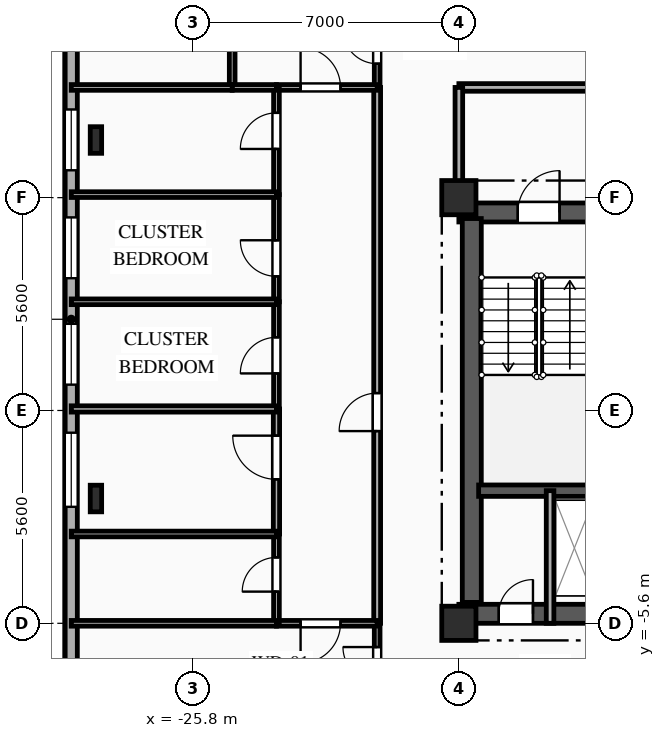
"""IFC4 building model, lengths in metres.
Left out: names, types, materials, properties, quantities, classifications, styles, units other than length and angle.
Written with IfcOpenShell. Run it as: python <this file> out.ifc"""

import sys

from ifc_helpers import new_model, si_unit, direction, frame, frame_2d, origin, origin_2d, place, context, subcontext, project, spatial, rectangle, i_section, extrude, element, fill, save


model = new_model("IFC4")
c1 = context("Model", 3, precision=1e-05, world=origin(), true_north=direction((0.0, 1.0)))
c2 = subcontext(c1, "Body", "Model", "MODEL_VIEW")
j1 = project(units=[si_unit("LENGTHUNIT", "METRE"), si_unit("PLANEANGLEUNIT", "RADIAN")], contexts=[c1])
p1 = place(None, origin())
s1 = spatial("IfcSite", under=j1, at=p1, CompositionType="ELEMENT")
p2 = place(p1, origin())
s2 = spatial("IfcBuilding", under=s1, at=p2, CompositionType="ELEMENT")
p3 = place(p2, frame((0.0, 0.0, 154.45)))
s3 = spatial("IfcBuildingStorey", under=s2, at=p3, CompositionType="ELEMENT", Elevation=154.45)
for number, where, z_axis, x_axis in (
    (1, (-18.8, -5.6, 0.0), (0.0, 0.0, 1.0), (1.0, 0.0, 0.0)),
    (2, (-18.8, 5.6, 0.0), (0.0, 0.0, 1.0), (1.0, 0.0, 0.0)),
):
    element("IfcColumn", number, at=place(p3, frame(where, z_axis=z_axis, x_axis=x_axis)), inside=s3, PredefinedType="COLUMN", context=c2, shape_type="SweptSolid", body=[
        extrude(rectangle(XDim=0.9, YDim=0.9, at=origin_2d()), origin(), (0.0, 0.0, 1.0), 3.35),
    ])
for number, where, z_axis, x_axis in (
    (3, (-28.35, 7.117, 0.0), (0.0, 0.0, 1.0), (1.0, 0.0, 0.0)),
    (4, (-28.35, -2.317, 0.0), (0.0, 0.0, 1.0), (1.0, 0.0, 0.0)),
):
    element("IfcColumn", number, at=place(p3, frame(where, z_axis=z_axis, x_axis=x_axis)), inside=s3, PredefinedType="COLUMN", context=c2, shape_type="SweptSolid", body=[
        extrude(i_section(OverallWidth=0.3, OverallDepth=0.7, WebThickness=0.017, FlangeThickness=0.032, FilletRadius=0.027, at=origin_2d()), origin(), (0.0, 0.0, 1.0), 3.35),
    ])
p4 = place(p3, frame((-29.0, -12.4, 0.0), z_axis=(0.0, 0.0, 1.0), x_axis=(0.0, 1.0, 0.0)))
e5 = element("IfcWall", 5, at=p4, inside=s3, PredefinedType="SOLIDWALL", context=c2, shape_type="SweptSolid", body=[
    extrude(rectangle(XDim=29.6, YDim=0.32, at=frame_2d((14.8, 0.0))), origin(), (0.0, 0.0, 1.0), 3.04),
])
p5 = place(p4, frame((2.855, 0.0, 0.85)))
e6 = element("IfcOpeningElement", 6, at=p5, cuts=e5, PredefinedType="OPENING", context=c2, shape_type="SweptSolid", body=[
    extrude(rectangle(XDim=1.65, YDim=1.85, at=frame_2d((0.825, 0.925))), frame((0.0, 0.17, 0.0), z_axis=(0.0, -1.0, 0.0), x_axis=(1.0, 0.0, 0.0)), (0.0, 0.0, 1.0), 0.34),
])
p6 = place(p4, frame((9.865, 0.0, 0.85)))
e7 = element("IfcOpeningElement", 7, at=p6, cuts=e5, PredefinedType="OPENING", context=c2, shape_type="SweptSolid", body=[
    extrude(rectangle(XDim=1.95, YDim=1.85, at=frame_2d((0.975, 0.925))), frame((0.0, 0.17, 0.0), z_axis=(0.0, -1.0, 0.0), x_axis=(1.0, 0.0, 0.0)), (0.0, 0.0, 1.0), 0.34),
])
p7 = place(p4, frame((13.08, 0.0, 0.85)))
e8 = element("IfcOpeningElement", 8, at=p7, cuts=e5, PredefinedType="OPENING", context=c2, shape_type="SweptSolid", body=[
    extrude(rectangle(XDim=1.6, YDim=1.85, at=frame_2d((0.8, 0.925))), frame((0.0, 0.17, 0.0), z_axis=(0.0, -1.0, 0.0), x_axis=(1.0, 0.0, 0.0)), (0.0, 0.0, 1.0), 0.34),
])
p8 = place(p4, frame((15.88, 0.0, 0.85)))
e9 = element("IfcOpeningElement", 9, at=p8, cuts=e5, PredefinedType="OPENING", context=c2, shape_type="SweptSolid", body=[
    extrude(rectangle(XDim=1.6, YDim=1.85, at=frame_2d((0.8, 0.925))), frame((0.0, 0.17, 0.0), z_axis=(0.0, -1.0, 0.0), x_axis=(1.0, 0.0, 0.0)), (0.0, 0.0, 1.0), 0.34),
])
p9 = place(p4, frame((18.72, 0.0, 0.85)))
e10 = element("IfcOpeningElement", 10, at=p9, cuts=e5, PredefinedType="OPENING", context=c2, shape_type="SweptSolid", body=[
    extrude(rectangle(XDim=1.6, YDim=1.85, at=frame_2d((0.8, 0.925))), frame((0.0, 0.17, 0.0), z_axis=(0.0, -1.0, 0.0), x_axis=(1.0, 0.0, 0.0)), (0.0, 0.0, 1.0), 0.34),
])
p10 = place(p4, frame((24.255, 0.0, 0.85)))
e11 = element("IfcOpeningElement", 11, at=p10, cuts=e5, PredefinedType="OPENING", context=c2, shape_type="SweptSolid", body=[
    extrude(rectangle(XDim=1.65, YDim=1.85, at=frame_2d((0.825, 0.925))), frame((0.0, 0.17, 0.0), z_axis=(0.0, -1.0, 0.0), x_axis=(1.0, 0.0, 0.0)), (0.0, 0.0, 1.0), 0.34),
])
p11 = place(p3, frame((-18.8, 5.21, 0.0), z_axis=(0.0, 0.0, 1.0), x_axis=(1.0, 0.0, 0.0)))
e12 = element("IfcWall", 12, at=p11, inside=s3, PredefinedType="SHEAR", context=c2, shape_type="SweptSolid", body=[
    extrude(rectangle(XDim=9.6, YDim=0.5, at=frame_2d((4.8, 0.0))), origin(), (0.0, 0.0, 1.0), 3.04),
])
p12 = place(p11, frame((1.55, 0.0, 0.0)))
e13 = element("IfcOpeningElement", 13, at=p12, cuts=e12, PredefinedType="OPENING", context=c2, shape_type="SweptSolid", body=[
    extrude(rectangle(XDim=1.1, YDim=2.15, at=frame_2d((0.55, 1.075))), frame((0.0, 0.26, 0.0), z_axis=(0.0, -1.0, 0.0), x_axis=(1.0, 0.0, 0.0)), (0.0, 0.0, 1.0), 0.52),
])
p13 = place(p11, frame((4.775, 0.0, 0.0)))
e14 = element("IfcOpeningElement", 14, at=p13, cuts=e12, PredefinedType="OPENING", context=c2, shape_type="SweptSolid", body=[
    extrude(rectangle(XDim=1.05, YDim=2.1, at=frame_2d((0.525, 1.05))), frame((0.0, 0.26, 0.0), z_axis=(0.0, -1.0, 0.0), x_axis=(1.0, 0.0, 0.0)), (0.0, 0.0, 1.0), 0.52),
])
p14 = place(p3, frame((-18.8, -5.35, 0.0), z_axis=(0.0, 0.0, 1.0), x_axis=(1.0, 0.0, 0.0)))
e15 = element("IfcWall", 15, at=p14, inside=s3, PredefinedType="SHEAR", context=c2, shape_type="SweptSolid", body=[
    extrude(rectangle(XDim=9.6, YDim=0.5, at=frame_2d((4.8, 0.0))), origin(), (0.0, 0.0, 1.0), 3.04),
])
p15 = place(p14, frame((1.05, 0.0, 0.0)))
e16 = element("IfcOpeningElement", 16, at=p15, cuts=e15, PredefinedType="OPENING", context=c2, shape_type="SweptSolid", body=[
    extrude(rectangle(XDim=0.9, YDim=2.1, at=frame_2d((0.45, 1.05))), frame((0.0, 0.26, 0.0), z_axis=(0.0, -1.0, 0.0), x_axis=(1.0, 0.0, 0.0)), (0.0, 0.0, 1.0), 0.52),
])
p16 = place(p3, frame((-18.46, -5.05, 0.0), z_axis=(0.0, 0.0, 1.0), x_axis=(0.0, 1.0, 0.0)))
e17 = element("IfcWall", 17, at=p16, inside=s3, PredefinedType="SHEAR", context=c2, shape_type="SweptSolid", body=[
    extrude(rectangle(XDim=10.1, YDim=0.5, at=frame_2d((5.05, 0.0))), origin(), (0.0, 0.0, 1.0), 3.04),
])
p17 = place(p3, frame((-18.28, -2.11, 0.0), z_axis=(0.0, 0.0, 1.0), x_axis=(1.0, 0.0, 0.0)))
e18 = element("IfcWall", 18, at=p17, inside=s3, PredefinedType="SHEAR", context=c2, shape_type="SweptSolid", body=[
    extrude(rectangle(XDim=3.18, YDim=0.3, at=frame_2d((1.59, 0.0))), origin(), (0.0, 0.0, 1.0), 3.04),
])
p18 = place(p3, frame((-16.4, -5.6, 0.0), z_axis=(0.0, 0.0, 1.0), x_axis=(0.0, 1.0, 0.0)))
e19 = element("IfcWall", 19, at=p18, inside=s3, PredefinedType="PARTITIONING", context=c2, shape_type="SweptSolid", body=[
    extrude(rectangle(XDim=3.49, YDim=0.2, at=frame_2d((1.745, 0.0))), origin(), (0.0, 0.0, 1.0), 3.04),
])
p19 = place(p3, frame((-12.0, 8.5, 0.0), z_axis=(0.0, 0.0, 1.0), x_axis=(-1.0, 0.0, 0.0)))
e20 = element("IfcWall", 20, at=p19, inside=s3, PredefinedType="PARTITIONING", context=c2, shape_type="SweptSolid", body=[
    extrude(rectangle(XDim=6.8, YDim=0.2, at=frame_2d((3.4, 0.0))), origin(), (0.0, 0.0, 1.0), 3.04),
])
p20 = place(p19, frame((1.715, 0.0, 0.0)))
e21 = element("IfcOpeningElement", 21, at=p20, cuts=e20, PredefinedType="OPENING", context=c2, shape_type="SweptSolid", body=[
    extrude(rectangle(XDim=1.1, YDim=2.15, at=frame_2d((0.55, 1.075))), frame((0.0, 0.11, 0.0), z_axis=(0.0, -1.0, 0.0), x_axis=(1.0, 0.0, 0.0)), (0.0, 0.0, 1.0), 0.22),
])
p21 = place(p3, frame((-18.8, 8.5, 0.0), z_axis=(0.0, 0.0, 1.0), x_axis=(0.0, -1.0, 0.0)))
e22 = element("IfcWall", 22, at=p21, inside=s3, PredefinedType="PARTITIONING", context=c2, shape_type="SweptSolid", body=[
    extrude(rectangle(XDim=2.9, YDim=0.2, at=frame_2d((1.45, 0.0))), origin(), (0.0, 0.0, 1.0), 2.525),
])
p22 = place(p3, frame((-20.95, 8.5, 0.0), z_axis=(0.0, 0.0, 1.0), x_axis=(0.0, 1.0, 0.0)))
e23 = element("IfcWall", 23, at=p22, inside=s3, PredefinedType="PARTITIONING", context=c2, shape_type="SweptSolid", body=[
    extrude(rectangle(XDim=2.15, YDim=0.15, at=frame_2d((1.075, 0.0))), origin(), (0.0, 0.0, 1.0), 3.04),
])
p23 = place(p22, frame((0.625, 0.0, 0.0)))
e24 = element("IfcOpeningElement", 24, at=p23, cuts=e23, PredefinedType="OPENING", context=c2, shape_type="SweptSolid", body=[
    extrude(rectangle(XDim=0.9, YDim=2.1, at=frame_2d((0.45, 1.05))), frame((0.0, 0.085, 0.0), z_axis=(0.0, -1.0, 0.0), x_axis=(1.0, 0.0, 0.0)), (0.0, 0.0, 1.0), 0.17),
])
p24 = place(p3, frame((-20.95, -7.75, 0.0), z_axis=(0.0, 0.0, 1.0), x_axis=(0.0, 1.0, 0.0)))
e25 = element("IfcWall", 25, at=p24, inside=s3, PredefinedType="PARTITIONING", context=c2, shape_type="SweptSolid", body=[
    extrude(rectangle(XDim=2.15, YDim=0.15, at=frame_2d((1.075, 0.0))), origin(), (0.0, 0.0, 1.0), 3.04),
])
p25 = place(p24, frame((0.625, 0.0, 0.0)))
e26 = element("IfcOpeningElement", 26, at=p25, cuts=e25, PredefinedType="OPENING", context=c2, shape_type="SweptSolid", body=[
    extrude(rectangle(XDim=0.9, YDim=2.1, at=frame_2d((0.45, 1.05))), frame((0.0, 0.085, 0.0), z_axis=(0.0, -1.0, 0.0), x_axis=(1.0, 0.0, 0.0)), (0.0, 0.0, 1.0), 0.17),
])
p26 = place(p3, frame((-20.95, -5.6, 0.0), z_axis=(0.0, 0.0, 1.0), x_axis=(0.0, 1.0, 0.0)))
e27 = element("IfcWall", 27, at=p26, inside=s3, PredefinedType="PARTITIONING", context=c2, shape_type="SweptSolid", body=[
    extrude(rectangle(XDim=14.1, YDim=0.18, at=frame_2d((7.05, 0.0))), origin(), (0.0, 0.0, 1.0), 3.04),
])
p27 = place(p26, frame((5.058, 0.0, 0.0)))
e28 = element("IfcOpeningElement", 28, at=p27, cuts=e27, PredefinedType="OPENING", context=c2, shape_type="SweptSolid", body=[
    extrude(rectangle(XDim=1.0, YDim=2.15, at=frame_2d((0.5, 1.075))), frame((0.0, 0.1, 0.0), z_axis=(0.0, -1.0, 0.0), x_axis=(1.0, 0.0, 0.0)), (0.0, 0.0, 1.0), 0.2),
])
p28 = place(p3, frame((-23.6, 8.5, 0.0), z_axis=(0.0, 0.0, 1.0), x_axis=(1.0, 0.0, 0.0)))
e29 = element("IfcWall", 29, at=p28, inside=s3, PredefinedType="PARTITIONING", context=c2, shape_type="SweptSolid", body=[
    extrude(rectangle(XDim=2.65, YDim=0.15, at=frame_2d((1.325, 0.0))), origin(), (0.0, 0.0, 1.0), 3.04),
])
p29 = place(p28, frame((0.635, 0.0, 0.0)))
e30 = element("IfcOpeningElement", 30, at=p29, cuts=e29, PredefinedType="OPENING", context=c2, shape_type="SweptSolid", body=[
    extrude(rectangle(XDim=1.05, YDim=2.15, at=frame_2d((0.525, 1.075))), frame((0.0, 0.085, 0.0), z_axis=(0.0, -1.0, 0.0), x_axis=(1.0, 0.0, 0.0)), (0.0, 0.0, 1.0), 0.17),
])
p30 = place(p3, frame((-20.95, -5.6, 0.0), z_axis=(0.0, 0.0, 1.0), x_axis=(-1.0, 0.0, 0.0)))
e31 = element("IfcWall", 31, at=p30, inside=s3, PredefinedType="PARTITIONING", context=c2, shape_type="SweptSolid", body=[
    extrude(rectangle(XDim=2.65, YDim=0.15, at=frame_2d((1.325, 0.0))), origin(), (0.0, 0.0, 1.0), 3.04),
])
p31 = place(p30, frame((0.965, 0.0, 0.0)))
e32 = element("IfcOpeningElement", 32, at=p31, cuts=e31, PredefinedType="OPENING", context=c2, shape_type="SweptSolid", body=[
    extrude(rectangle(XDim=1.05, YDim=2.15, at=frame_2d((0.525, 1.075))), frame((0.0, 0.085, 0.0), z_axis=(0.0, -1.0, 0.0), x_axis=(1.0, 0.0, 0.0)), (0.0, 0.0, 1.0), 0.17),
])
p32 = place(p3, frame((-23.6, -5.6, 0.0), z_axis=(0.0, 0.0, 1.0), x_axis=(0.0, 1.0, 0.0)))
e33 = element("IfcWall", 33, at=p32, inside=s3, PredefinedType="PLUMBINGWALL", context=c2, shape_type="SweptSolid", body=[
    extrude(rectangle(XDim=2.35, YDim=0.15, at=frame_2d((1.175, 0.0))), origin(), (0.0, 0.0, 1.0), 2.695),
])
p33 = place(p32, frame((0.834, 0.0, 0.0)))
e34 = element("IfcOpeningElement", 34, at=p33, cuts=e33, PredefinedType="OPENING", context=c2, shape_type="SweptSolid", body=[
    extrude(rectangle(XDim=0.9, YDim=2.1, at=frame_2d((0.45, 1.05))), frame((0.0, 0.085, 0.0), z_axis=(0.0, -1.0, 0.0), x_axis=(1.0, 0.0, 0.0)), (0.0, 0.0, 1.0), 0.17),
])
p34 = place(p3, frame((-23.6, -3.25, 0.0), z_axis=(0.0, 0.0, 1.0), x_axis=(0.0, 1.0, 0.0)))
e35 = element("IfcWall", 35, at=p34, inside=s3, PredefinedType="PARTITIONING", context=c2, shape_type="SweptSolid", body=[
    extrude(rectangle(XDim=3.29, YDim=0.165, at=frame_2d((1.645, 0.0))), origin(), (0.0, 0.0, 1.0), 2.695),
])
p35 = place(p34, frame((1.438, 0.0, 0.0)))
e36 = element("IfcOpeningElement", 36, at=p35, cuts=e35, PredefinedType="OPENING", context=c2, shape_type="SweptSolid", body=[
    extrude(rectangle(XDim=1.15, YDim=2.15, at=frame_2d((0.575, 1.075))), frame((0.0, 0.093, 0.0), z_axis=(0.0, -1.0, 0.0), x_axis=(1.0, 0.0, 0.0)), (0.0, 0.0, 1.0), 0.185),
])
p36 = place(p3, frame((-23.6, 0.04, 0.0), z_axis=(0.0, 0.0, 1.0), x_axis=(0.0, 1.0, 0.0)))
e37 = element("IfcWall", 37, at=p36, inside=s3, PredefinedType="PARTITIONING", context=c2, shape_type="SweptSolid", body=[
    extrude(rectangle(XDim=2.82, YDim=0.15, at=frame_2d((1.41, 0.0))), origin(), (0.0, 0.0, 1.0), 2.695),
])
p37 = place(p36, frame((0.935, 0.0, 0.0)))
e38 = element("IfcOpeningElement", 38, at=p37, cuts=e37, PredefinedType="OPENING", context=c2, shape_type="SweptSolid", body=[
    extrude(rectangle(XDim=0.95, YDim=2.1, at=frame_2d((0.475, 1.05))), frame((0.0, 0.085, 0.0), z_axis=(0.0, -1.0, 0.0), x_axis=(1.0, 0.0, 0.0)), (0.0, 0.0, 1.0), 0.17),
])
p38 = place(p3, frame((-23.6, 2.86, 0.0), z_axis=(0.0, 0.0, 1.0), x_axis=(0.0, 1.0, 0.0)))
e39 = element("IfcWall", 39, at=p38, inside=s3, PredefinedType="PARTITIONING", context=c2, shape_type="SweptSolid", body=[
    extrude(rectangle(XDim=2.82, YDim=0.15, at=frame_2d((1.41, 0.0))), origin(), (0.0, 0.0, 1.0), 2.695),
])
p39 = place(p38, frame((0.669, 0.0, 0.0)))
e40 = element("IfcOpeningElement", 40, at=p39, cuts=e39, PredefinedType="OPENING", context=c2, shape_type="SweptSolid", body=[
    extrude(rectangle(XDim=0.95, YDim=2.1, at=frame_2d((0.475, 1.05))), frame((0.0, 0.085, 0.0), z_axis=(0.0, -1.0, 0.0), x_axis=(1.0, 0.0, 0.0)), (0.0, 0.0, 1.0), 0.17),
])
p40 = place(p3, frame((-23.6, 5.68, 0.0), z_axis=(0.0, 0.0, 1.0), x_axis=(0.0, 1.0, 0.0)))
e41 = element("IfcWall", 41, at=p40, inside=s3, PredefinedType="PARTITIONING", context=c2, shape_type="SweptSolid", body=[
    extrude(rectangle(XDim=2.82, YDim=0.15, at=frame_2d((1.41, 0.0))), origin(), (0.0, 0.0, 1.0), 2.695),
])
p41 = place(p40, frame((1.201, 0.0, 0.0)))
e42 = element("IfcOpeningElement", 42, at=p41, cuts=e41, PredefinedType="OPENING", context=c2, shape_type="SweptSolid", body=[
    extrude(rectangle(XDim=0.95, YDim=2.1, at=frame_2d((0.475, 1.05))), frame((0.0, 0.085, 0.0), z_axis=(0.0, -1.0, 0.0), x_axis=(1.0, 0.0, 0.0)), (0.0, 0.0, 1.0), 0.17),
])
p42 = place(p3, frame((-24.765, 8.5, 0.0), z_axis=(0.0, 0.0, 1.0), x_axis=(0.0, 1.0, 0.0)))
e43 = element("IfcWall", 43, at=p42, inside=s3, PredefinedType="PARTITIONING", context=c2, shape_type="SweptSolid", body=[
    extrude(rectangle(XDim=11.9, YDim=0.15, at=frame_2d((5.95, 0.0))), origin(), (0.0, 0.0, 1.0), 3.04),
])
p43 = place(p42, frame((3.002, 0.0, 0.0)))
e44 = element("IfcOpeningElement", 44, at=p43, cuts=e43, PredefinedType="OPENING", context=c2, shape_type="SweptSolid", body=[
    extrude(rectangle(XDim=1.05, YDim=2.15, at=frame_2d((0.525, 1.075))), frame((0.0, 0.085, 0.0), z_axis=(0.0, -1.0, 0.0), x_axis=(1.0, 0.0, 0.0)), (0.0, 0.0, 1.0), 0.17),
])
p44 = place(p3, frame((-23.6, 8.5, 0.0), z_axis=(0.0, 0.0, 1.0), x_axis=(-1.0, 0.0, 0.0)))
e45 = element("IfcWall", 45, at=p44, inside=s3, PredefinedType="PARTITIONING", context=c2, shape_type="SweptSolid", body=[
    extrude(rectangle(XDim=1.165, YDim=0.15, at=frame_2d((0.583, 0.0))), origin(), (0.0, 0.0, 1.0), 3.04),
])
p45 = place(p3, frame((-24.765, 8.5, 0.0), z_axis=(0.0, 0.0, 1.0), x_axis=(-1.0, 0.0, 0.0)))
e46 = element("IfcWall", 46, at=p45, inside=s3, PredefinedType="PARTITIONING", context=c2, shape_type="SweptSolid", body=[
    extrude(rectangle(XDim=4.235, YDim=0.15, at=frame_2d((2.118, 0.0))), origin(), (0.0, 0.0, 1.0), 3.04),
])
for number, where, z_axis, x_axis in (
    (47, (-29.0, -5.6, 0.0), (0.0, 0.0, 1.0), (1.0, 0.0, 0.0)),
    (48, (-29.0, -3.25, 0.0), (0.0, 0.0, 1.0), (1.0, 0.0, 0.0)),
):
    element("IfcWall", number, at=place(p3, frame(where, z_axis=z_axis, x_axis=x_axis)), inside=s3, PredefinedType="PLUMBINGWALL", context=c2, shape_type="SweptSolid", body=[
        extrude(rectangle(XDim=5.4, YDim=0.15, at=frame_2d((2.7, 0.0))), origin(), (0.0, 0.0, 1.0), 3.04),
    ])
p46 = place(p3, frame((-29.0, 0.04, 0.0), z_axis=(0.0, 0.0, 1.0), x_axis=(1.0, 0.0, 0.0)))
e49 = element("IfcWall", 49, at=p46, inside=s3, PredefinedType="PARTITIONING", context=c2, shape_type="SweptSolid", body=[
    extrude(rectangle(XDim=5.4, YDim=0.165, at=frame_2d((2.7, 0.0))), origin(), (0.0, 0.0, 1.0), 3.04),
])
for number, where, z_axis, x_axis in (
    (50, (-29.0, 2.86, 0.0), (0.0, 0.0, 1.0), (1.0, 0.0, 0.0)),
    (51, (-29.0, 5.68, 0.0), (0.0, 0.0, 1.0), (1.0, 0.0, 0.0)),
):
    element("IfcWall", number, at=place(p3, frame(where, z_axis=z_axis, x_axis=x_axis)), inside=s3, PredefinedType="PARTITIONING", context=c2, shape_type="SweptSolid", body=[
        extrude(rectangle(XDim=5.4, YDim=0.15, at=frame_2d((2.7, 0.0))), origin(), (0.0, 0.0, 1.0), 3.04),
    ])
p47 = place(p6, origin())
e52 = element("IfcWindow", 52, at=p47, inside=s3, PartitioningType="SINGLE_PANEL", PredefinedType="WINDOW", context=c2, shape_type="SweptSolid", body=[
    extrude(rectangle(XDim=1.95, YDim=1.85, at=frame_2d((0.975, 0.925))), frame((0.0, 0.03, 0.0), z_axis=(0.0, -1.0, 0.0), x_axis=(1.0, 0.0, 0.0)), (0.0, 0.0, 1.0), 0.06),
])
fill(e7, e52)
p48 = place(p7, origin())
e53 = element("IfcWindow", 53, at=p48, inside=s3, PartitioningType="SINGLE_PANEL", PredefinedType="WINDOW", context=c2, shape_type="SweptSolid", body=[
    extrude(rectangle(XDim=1.6, YDim=1.85, at=frame_2d((0.8, 0.925))), frame((0.0, 0.03, 0.0), z_axis=(0.0, -1.0, 0.0), x_axis=(1.0, 0.0, 0.0)), (0.0, 0.0, 1.0), 0.06),
])
fill(e8, e53)
p49 = place(p8, origin())
e54 = element("IfcWindow", 54, at=p49, inside=s3, PartitioningType="SINGLE_PANEL", PredefinedType="WINDOW", context=c2, shape_type="SweptSolid", body=[
    extrude(rectangle(XDim=1.6, YDim=1.85, at=frame_2d((0.8, 0.925))), frame((0.0, 0.03, 0.0), z_axis=(0.0, -1.0, 0.0), x_axis=(1.0, 0.0, 0.0)), (0.0, 0.0, 1.0), 0.06),
])
fill(e9, e54)
p50 = place(p9, origin())
e55 = element("IfcWindow", 55, at=p50, inside=s3, PartitioningType="SINGLE_PANEL", PredefinedType="WINDOW", context=c2, shape_type="SweptSolid", body=[
    extrude(rectangle(XDim=1.6, YDim=1.85, at=frame_2d((0.8, 0.925))), frame((0.0, 0.03, 0.0), z_axis=(0.0, -1.0, 0.0), x_axis=(1.0, 0.0, 0.0)), (0.0, 0.0, 1.0), 0.06),
])
fill(e10, e55)
p51 = place(p12, origin())
e56 = element("IfcDoor", 56, at=p51, inside=s3, OperationType="SINGLE_SWING_RIGHT", PredefinedType="DOOR", context=c2, shape_type="SweptSolid", body=[
    extrude(rectangle(XDim=1.1, YDim=2.15, at=frame_2d((0.55, 1.075))), frame((0.0, 0.025, 0.0), z_axis=(0.0, -1.0, 0.0), x_axis=(1.0, 0.0, 0.0)), (0.0, 0.0, 1.0), 0.05),
])
fill(e13, e56)
p52 = place(p15, origin())
e57 = element("IfcDoor", 57, at=p52, inside=s3, OperationType="SINGLE_SWING_RIGHT", PredefinedType="DOOR", context=c2, shape_type="SweptSolid", body=[
    extrude(rectangle(XDim=0.9, YDim=2.1, at=frame_2d((0.45, 1.05))), frame((0.0, 0.025, 0.0), z_axis=(0.0, -1.0, 0.0), x_axis=(1.0, 0.0, 0.0)), (0.0, 0.0, 1.0), 0.05),
])
fill(e16, e57)
p53 = place(p23, origin())
e58 = element("IfcDoor", 58, at=p53, inside=s3, OperationType="SINGLE_SWING_RIGHT", PredefinedType="DOOR", context=c2, shape_type="SweptSolid", body=[
    extrude(rectangle(XDim=0.9, YDim=2.1, at=frame_2d((0.45, 1.05))), frame((0.0, 0.025, 0.0), z_axis=(0.0, -1.0, 0.0), x_axis=(1.0, 0.0, 0.0)), (0.0, 0.0, 1.0), 0.05),
])
fill(e24, e58)
p54 = place(p25, origin())
e59 = element("IfcDoor", 59, at=p54, inside=s3, OperationType="SINGLE_SWING_RIGHT", PredefinedType="DOOR", context=c2, shape_type="SweptSolid", body=[
    extrude(rectangle(XDim=0.9, YDim=2.1, at=frame_2d((0.45, 1.05))), frame((0.0, 0.025, 0.0), z_axis=(0.0, -1.0, 0.0), x_axis=(1.0, 0.0, 0.0)), (0.0, 0.0, 1.0), 0.05),
])
fill(e26, e59)
p55 = place(p27, origin())
e60 = element("IfcDoor", 60, at=p55, inside=s3, OperationType="SINGLE_SWING_LEFT", PredefinedType="DOOR", context=c2, shape_type="SweptSolid", body=[
    extrude(rectangle(XDim=1.0, YDim=2.15, at=frame_2d((0.5, 1.075))), frame((0.0, 0.025, 0.0), z_axis=(0.0, -1.0, 0.0), x_axis=(1.0, 0.0, 0.0)), (0.0, 0.0, 1.0), 0.05),
])
fill(e28, e60)
p56 = place(p29, origin())
e61 = element("IfcDoor", 61, at=p56, inside=s3, OperationType="SINGLE_SWING_LEFT", PredefinedType="DOOR", context=c2, shape_type="SweptSolid", body=[
    extrude(rectangle(XDim=1.05, YDim=2.15, at=frame_2d((0.525, 1.075))), frame((0.0, 0.025, 0.0), z_axis=(0.0, -1.0, 0.0), x_axis=(1.0, 0.0, 0.0)), (0.0, 0.0, 1.0), 0.05),
])
fill(e30, e61)
p57 = place(p31, origin())
e62 = element("IfcDoor", 62, at=p57, inside=s3, OperationType="SINGLE_SWING_RIGHT", PredefinedType="DOOR", context=c2, shape_type="SweptSolid", body=[
    extrude(rectangle(XDim=1.05, YDim=2.15, at=frame_2d((0.525, 1.075))), frame((0.0, 0.025, 0.0), z_axis=(0.0, -1.0, 0.0), x_axis=(1.0, 0.0, 0.0)), (0.0, 0.0, 1.0), 0.05),
])
fill(e32, e62)
p58 = place(p33, origin())
e63 = element("IfcDoor", 63, at=p58, inside=s3, OperationType="SINGLE_SWING_LEFT", PredefinedType="DOOR", context=c2, shape_type="SweptSolid", body=[
    extrude(rectangle(XDim=0.9, YDim=2.1, at=frame_2d((0.45, 1.05))), frame((0.0, 0.025, 0.0), z_axis=(0.0, -1.0, 0.0), x_axis=(1.0, 0.0, 0.0)), (0.0, 0.0, 1.0), 0.05),
])
fill(e34, e63)
p59 = place(p35, origin())
e64 = element("IfcDoor", 64, at=p59, inside=s3, OperationType="SINGLE_SWING_RIGHT", PredefinedType="DOOR", context=c2, shape_type="SweptSolid", body=[
    extrude(rectangle(XDim=1.15, YDim=2.15, at=frame_2d((0.575, 1.075))), frame((0.0, 0.025, 0.0), z_axis=(0.0, -1.0, 0.0), x_axis=(1.0, 0.0, 0.0)), (0.0, 0.0, 1.0), 0.05),
])
fill(e36, e64)
p60 = place(p37, origin())
e65 = element("IfcDoor", 65, at=p60, inside=s3, OperationType="SINGLE_SWING_LEFT", PredefinedType="DOOR", context=c2, shape_type="SweptSolid", body=[
    extrude(rectangle(XDim=0.95, YDim=2.1, at=frame_2d((0.475, 1.05))), frame((0.0, 0.025, 0.0), z_axis=(0.0, -1.0, 0.0), x_axis=(1.0, 0.0, 0.0)), (0.0, 0.0, 1.0), 0.05),
])
fill(e38, e65)
p61 = place(p39, origin())
e66 = element("IfcDoor", 66, at=p61, inside=s3, OperationType="SINGLE_SWING_RIGHT", PredefinedType="DOOR", context=c2, shape_type="SweptSolid", body=[
    extrude(rectangle(XDim=0.95, YDim=2.1, at=frame_2d((0.475, 1.05))), frame((0.0, 0.025, 0.0), z_axis=(0.0, -1.0, 0.0), x_axis=(1.0, 0.0, 0.0)), (0.0, 0.0, 1.0), 0.05),
])
fill(e40, e66)
p62 = place(p41, origin())
e67 = element("IfcDoor", 67, at=p62, inside=s3, OperationType="SINGLE_SWING_LEFT", PredefinedType="DOOR", context=c2, shape_type="SweptSolid", body=[
    extrude(rectangle(XDim=0.95, YDim=2.1, at=frame_2d((0.475, 1.05))), frame((0.0, 0.025, 0.0), z_axis=(0.0, -1.0, 0.0), x_axis=(1.0, 0.0, 0.0)), (0.0, 0.0, 1.0), 0.05),
])
fill(e42, e67)
save(model, sys.argv[1])
